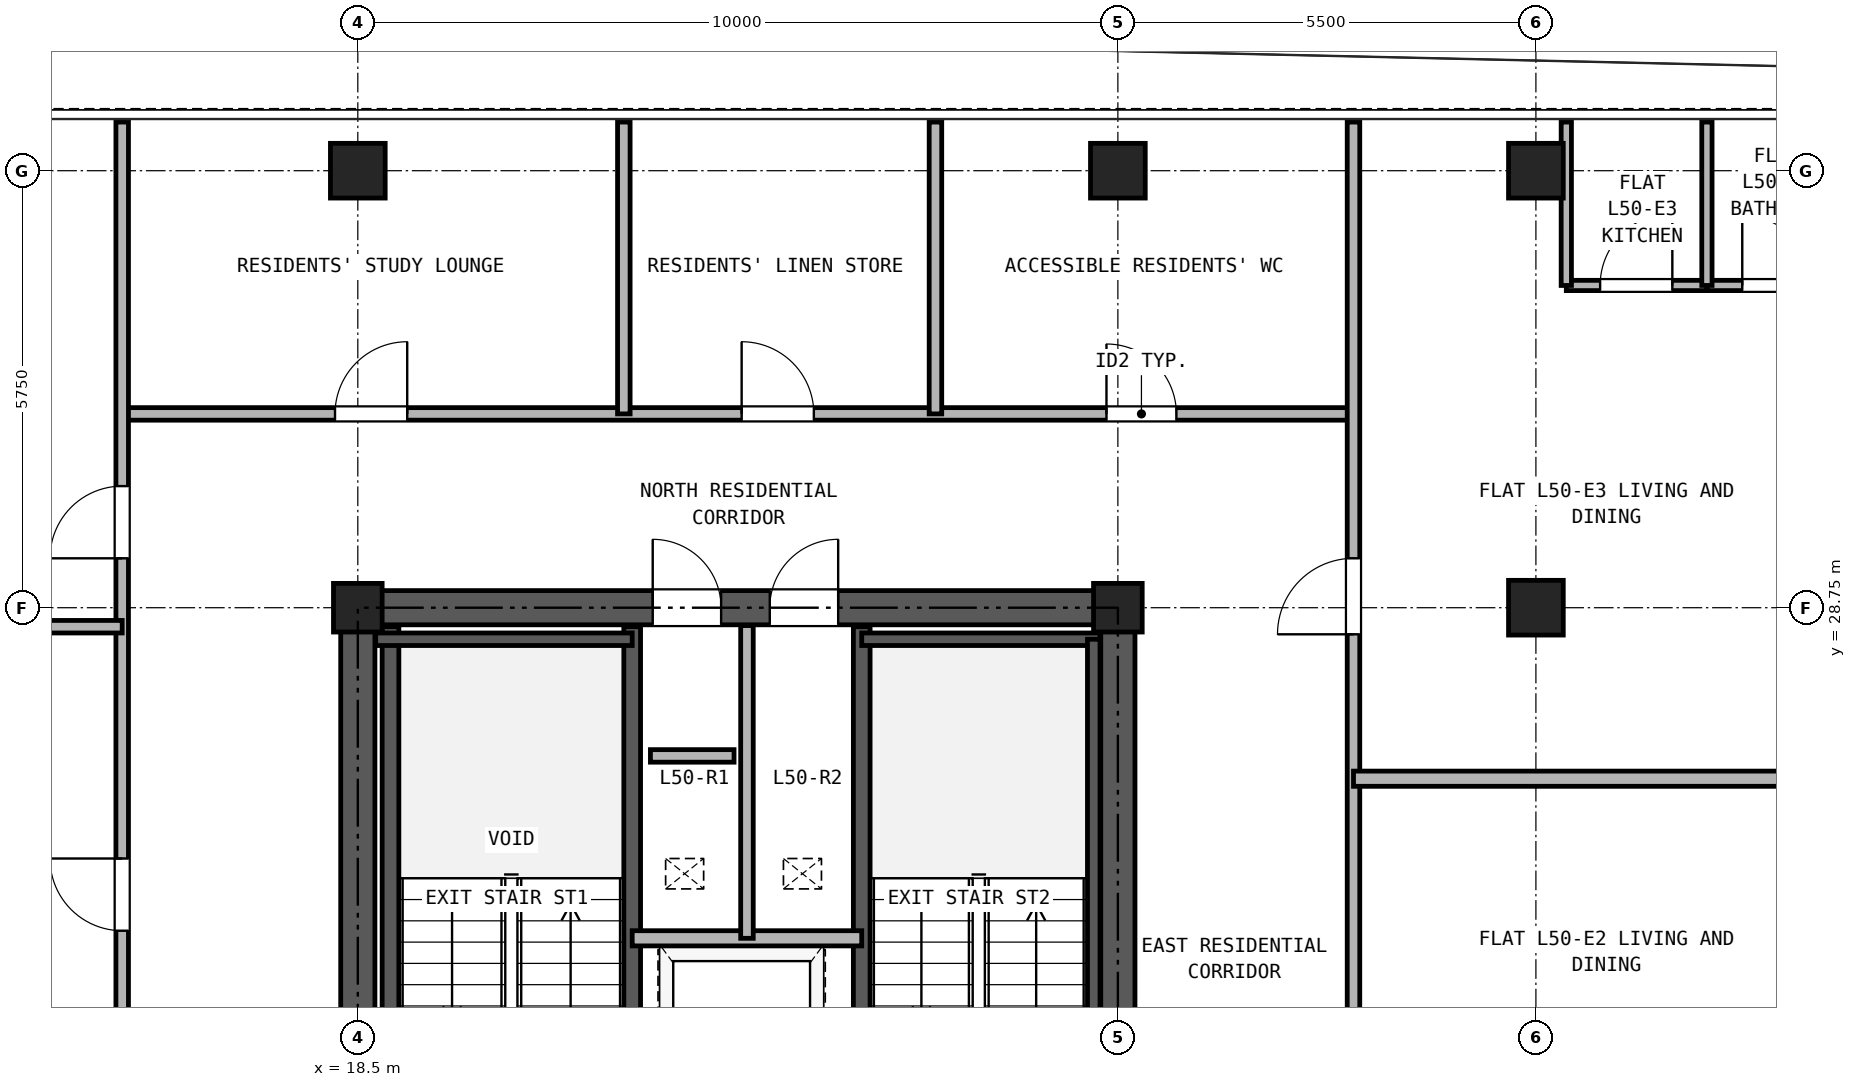
"""IFC4 building model, lengths in metres.
Left out: names, types, materials, properties, quantities, classifications, styles, units other than length and angle.
Written with IfcOpenShell. Run it as: python <this file> out.ifc"""

import sys

from ifc_helpers import new_model, si_unit, direction, frame, frame_2d, origin, origin_2d, place, context, subcontext, project, spatial, rectangle, hollow_rectangle, extrude, source, transform, mapped, element, fill, save


model = new_model("IFC4")
c1 = context("Model", 3, precision=1e-05, world=origin(), true_north=direction((0.0, 1.0)))
c2 = subcontext(c1, "Body", "Model", "MODEL_VIEW")
j1 = project(units=[si_unit("LENGTHUNIT", "METRE"), si_unit("PLANEANGLEUNIT", "RADIAN")], contexts=[c1])
p1 = place(None, origin())
s1 = spatial("IfcSite", under=j1, at=p1, CompositionType="ELEMENT")
p2 = place(p1, origin())
s2 = spatial("IfcBuilding", under=s1, at=p2, CompositionType="ELEMENT")
p3 = place(p2, frame((0.0, 0.0, 178.5)))
s3 = spatial("IfcBuildingStorey", under=s2, at=p3, CompositionType="ELEMENT", Elevation=178.5)
m1 = source(origin(), c2, "Body", "SweptSolid", [
    extrude(hollow_rectangle(XDim=0.72, YDim=0.72, WallThickness=0.04, at=origin_2d()), origin(), (0.0, 0.0, 1.0), 2.95),
])
for number, where, z_axis, x_axis in (
    (1, (18.5, 34.5, 0.0), (0.0, 0.0, 1.0), (1.0, 0.0, 0.0)),
    (2, (28.5, 34.5, 0.0), (0.0, 0.0, 1.0), (1.0, 0.0, 0.0)),
    (3, (34.0, 34.5, 0.0), (0.0, 0.0, 1.0), (1.0, 0.0, 0.0)),
):
    element("IfcColumn", number, at=place(p3, frame(where, z_axis=z_axis, x_axis=x_axis)), inside=s3, PredefinedType="COLUMN", context=c2, shape_type="MappedRepresentation", body=[
        mapped(m1, transform((0.0, 0.0, 0.0), x_axis=(1.0, 0.0, 0.0), y_axis=(0.0, 1.0, 0.0), z_axis=(0.0, 0.0, 1.0), scale=1.0)),
    ])
m2 = source(origin(), c2, "Body", "SweptSolid", [
    extrude(hollow_rectangle(XDim=0.64, YDim=0.64, WallThickness=0.035, at=origin_2d()), origin(), (0.0, 0.0, 1.0), 2.95),
])
for number, where, z_axis, x_axis in (
    (4, (18.5, 28.75, 0.0), (0.0, 0.0, 1.0), (1.0, 0.0, 0.0)),
    (5, (28.5, 28.75, 0.0), (0.0, 0.0, 1.0), (1.0, 0.0, 0.0)),
):
    element("IfcColumn", number, at=place(p3, frame(where, z_axis=z_axis, x_axis=x_axis)), inside=s3, PredefinedType="COLUMN", context=c2, shape_type="MappedRepresentation", body=[
        mapped(m2, transform((0.0, 0.0, 0.0), x_axis=(1.0, 0.0, 0.0), y_axis=(0.0, 1.0, 0.0), z_axis=(0.0, 0.0, 1.0), scale=1.0)),
    ])
p4 = place(p3, frame((34.0, 28.75, 0.0), z_axis=(0.0, 0.0, 1.0), x_axis=(1.0, 0.0, 0.0)))
e6 = element("IfcColumn", 6, at=p4, inside=s3, PredefinedType="COLUMN", context=c2, shape_type="MappedRepresentation", body=[
    mapped(m1, transform((0.0, 0.0, 0.0), x_axis=(1.0, 0.0, 0.0), y_axis=(0.0, 1.0, 0.0), z_axis=(0.0, 0.0, 1.0), scale=1.0)),
])
p5 = place(p3, frame((18.275, 28.75, 0.0), z_axis=(0.0, 0.0, 1.0), x_axis=(1.0, 0.0, 0.0)))
e7 = element("IfcWall", 7, at=p5, inside=s3, PredefinedType="SHEAR", context=c2, shape_type="SweptSolid", body=[
    extrude(rectangle(XDim=10.45, YDim=0.45, at=frame_2d((5.225, 0.0))), origin(), (0.0, 0.0, 1.0), 2.95),
])
p6 = place(p5, frame((4.105, 0.0, 0.0)))
e8 = element("IfcOpeningElement", 8, at=p6, cuts=e7, PredefinedType="OPENING", context=c2, shape_type="SweptSolid", body=[
    extrude(rectangle(XDim=0.9, YDim=2.05, at=frame_2d((0.45, 1.025))), frame((0.0, 0.235, 0.0), z_axis=(0.0, -1.0, 0.0), x_axis=(1.0, 0.0, 0.0)), (0.0, 0.0, 1.0), 0.47),
])
p7 = place(p5, frame((5.645, 0.0, 0.0)))
e9 = element("IfcOpeningElement", 9, at=p7, cuts=e7, PredefinedType="OPENING", context=c2, shape_type="SweptSolid", body=[
    extrude(rectangle(XDim=0.9, YDim=2.05, at=frame_2d((0.45, 1.025))), frame((0.0, 0.235, 0.0), z_axis=(0.0, -1.0, 0.0), x_axis=(1.0, 0.0, 0.0)), (0.0, 0.0, 1.0), 0.47),
])
p8 = place(p3, frame((18.5, 11.725, 0.0), z_axis=(0.0, 0.0, 1.0), x_axis=(0.0, 1.0, 0.0)))
e10 = element("IfcWall", 10, at=p8, inside=s3, PredefinedType="SHEAR", context=c2, shape_type="SweptSolid", body=[
    extrude(rectangle(XDim=16.8, YDim=0.45, at=frame_2d((8.4, 0.0))), origin(), (0.0, 0.0, 1.0), 2.95),
])
p9 = place(p8, frame((7.425, 0.0, 0.0)))
e11 = element("IfcOpeningElement", 11, at=p9, cuts=e10, PredefinedType="OPENING", context=c2, shape_type="SweptSolid", body=[
    extrude(rectangle(XDim=1.15, YDim=2.2, at=frame_2d((0.575, 1.1))), frame((0.0, 0.235, 0.0), z_axis=(0.0, -1.0, 0.0), x_axis=(1.0, 0.0, 0.0)), (0.0, 0.0, 1.0), 0.47),
])
p10 = place(p3, frame((28.5, 11.725, 0.0), z_axis=(0.0, 0.0, 1.0), x_axis=(0.0, 1.0, 0.0)))
e12 = element("IfcWall", 12, at=p10, inside=s3, PredefinedType="SHEAR", context=c2, shape_type="SweptSolid", body=[
    extrude(rectangle(XDim=16.8, YDim=0.45, at=frame_2d((8.4, 0.0))), origin(), (0.0, 0.0, 1.0), 2.95),
])
p11 = place(p10, frame((7.425, 0.0, 0.0)))
e13 = element("IfcOpeningElement", 13, at=p11, cuts=e12, PredefinedType="OPENING", context=c2, shape_type="SweptSolid", body=[
    extrude(rectangle(XDim=1.15, YDim=2.2, at=frame_2d((0.575, 1.1))), frame((0.0, 0.235, 0.0), z_axis=(0.0, -1.0, 0.0), x_axis=(1.0, 0.0, 0.0)), (0.0, 0.0, 1.0), 0.47),
])
for number, where, z_axis, x_axis in (
    (14, (18.93, 21.39, 0.0), (0.0, 0.0, 1.0), (0.0, 1.0, 0.0)),
    (15, (22.11, 21.39, 0.0), (0.0, 0.0, 1.0), (0.0, 1.0, 0.0)),
    (16, (25.13, 21.39, 0.0), (0.0, 0.0, 1.0), (0.0, 1.0, 0.0)),
):
    element("IfcWall", number, at=place(p3, frame(where, z_axis=z_axis, x_axis=x_axis)), inside=s3, PredefinedType="SOLIDWALL", context=c2, shape_type="SweptSolid", body=[
        extrude(rectangle(XDim=7.11, YDim=0.22, at=frame_2d((3.555, 0.0))), origin(), (0.0, 0.0, 1.0), 2.95),
    ])
p12 = place(p3, frame((18.735, 28.335, 0.0), z_axis=(0.0, 0.0, 1.0), x_axis=(1.0, 0.0, 0.0)))
e17 = element("IfcWall", 17, at=p12, inside=s3, PredefinedType="PARTITIONING", context=c2, shape_type="SweptSolid", body=[
    extrude(rectangle(XDim=3.375, YDim=0.165, at=frame_2d((1.688, 0.0))), origin(), (0.0, 0.0, 1.0), 2.95),
])
p13 = place(p3, frame((25.13, 28.335, 0.0), z_axis=(0.0, 0.0, 1.0), x_axis=(1.0, 0.0, 0.0)))
e18 = element("IfcWall", 18, at=p13, inside=s3, PredefinedType="PARTITIONING", context=c2, shape_type="SweptSolid", body=[
    extrude(rectangle(XDim=3.135, YDim=0.165, at=frame_2d((1.567, 0.0))), origin(), (0.0, 0.0, 1.0), 2.95),
])
p14 = place(p3, frame((28.183, 21.39, 0.0), z_axis=(0.0, 0.0, 1.0), x_axis=(0.0, 1.0, 0.0)))
e19 = element("IfcWall", 19, at=p14, inside=s3, PredefinedType="PARTITIONING", context=c2, shape_type="SweptSolid", body=[
    extrude(rectangle(XDim=6.945, YDim=0.165, at=frame_2d((3.473, 0.0))), origin(), (0.0, 0.0, 1.0), 2.95),
])
p15 = place(p3, frame((22.11, 24.4, 0.0), z_axis=(0.0, 0.0, 1.0), x_axis=(1.0, 0.0, 0.0)))
e20 = element("IfcWall", 20, at=p15, inside=s3, PredefinedType="PARTITIONING", context=c2, shape_type="SweptSolid", body=[
    extrude(rectangle(XDim=3.02, YDim=0.2, at=frame_2d((1.51, 0.0))), origin(), (0.0, 0.0, 1.0), 2.95),
])
p16 = place(p3, frame((23.62, 24.4, 0.0), z_axis=(0.0, 0.0, 1.0), x_axis=(0.0, 1.0, 0.0)))
e21 = element("IfcWall", 21, at=p16, inside=s3, PredefinedType="PARTITIONING", context=c2, shape_type="SweptSolid", body=[
    extrude(rectangle(XDim=4.115, YDim=0.165, at=frame_2d((2.058, 0.0))), origin(), (0.0, 0.0, 1.0), 2.95),
])
p17 = place(p3, frame((15.4, 31.3, 0.0), z_axis=(0.0, 0.0, 1.0), x_axis=(1.0, 0.0, 0.0)))
e22 = element("IfcWall", 22, at=p17, inside=s3, PredefinedType="PARTITIONING", context=c2, shape_type="SweptSolid", body=[
    extrude(rectangle(XDim=16.2, YDim=0.165, at=frame_2d((8.1, 0.0))), origin(), (0.0, 0.0, 1.0), 2.95),
])
p18 = place(p17, frame((2.8, 0.0, 0.0)))
e23 = element("IfcOpeningElement", 23, at=p18, cuts=e22, PredefinedType="OPENING", context=c2, shape_type="SweptSolid", body=[
    extrude(rectangle(XDim=0.95, YDim=2.15, at=frame_2d((0.475, 1.075))), frame((0.0, 0.093, 0.0), z_axis=(0.0, -1.0, 0.0), x_axis=(1.0, 0.0, 0.0)), (0.0, 0.0, 1.0), 0.185),
])
p19 = place(p17, frame((8.15, 0.0, 0.0)))
e24 = element("IfcOpeningElement", 24, at=p19, cuts=e22, PredefinedType="OPENING", context=c2, shape_type="SweptSolid", body=[
    extrude(rectangle(XDim=0.95, YDim=2.15, at=frame_2d((0.475, 1.075))), frame((0.0, 0.093, 0.0), z_axis=(0.0, -1.0, 0.0), x_axis=(1.0, 0.0, 0.0)), (0.0, 0.0, 1.0), 0.185),
])
p20 = place(p17, frame((12.95, 0.0, 0.0)))
e25 = element("IfcOpeningElement", 25, at=p20, cuts=e22, PredefinedType="OPENING", context=c2, shape_type="SweptSolid", body=[
    extrude(rectangle(XDim=0.92, YDim=2.1, at=frame_2d((0.46, 1.05))), frame((0.0, 0.093, 0.0), z_axis=(0.0, -1.0, 0.0), x_axis=(1.0, 0.0, 0.0)), (0.0, 0.0, 1.0), 0.185),
])
p21 = place(p3, frame((15.4, 10.7, 0.0), z_axis=(0.0, 0.0, 1.0), x_axis=(0.0, 1.0, 0.0)))
e26 = element("IfcWall", 26, at=p21, inside=s3, PredefinedType="PARTITIONING", context=c2, shape_type="SweptSolid", body=[
    extrude(rectangle(XDim=24.44, YDim=0.165, at=frame_2d((12.22, 0.0))), origin(), (0.0, 0.0, 1.0), 2.95),
])
p22 = place(p21, frame((4.9, 0.0, 0.0)))
e27 = element("IfcOpeningElement", 27, at=p22, cuts=e26, PredefinedType="OPENING", context=c2, shape_type="SweptSolid", body=[
    extrude(rectangle(XDim=0.95, YDim=2.15, at=frame_2d((0.475, 1.075))), frame((0.0, 0.093, 0.0), z_axis=(0.0, -1.0, 0.0), x_axis=(1.0, 0.0, 0.0)), (0.0, 0.0, 1.0), 0.185),
])
p23 = place(p21, frame((13.8, 0.0, 0.0)))
e28 = element("IfcOpeningElement", 28, at=p23, cuts=e26, PredefinedType="OPENING", context=c2, shape_type="SweptSolid", body=[
    extrude(rectangle(XDim=0.95, YDim=2.15, at=frame_2d((0.475, 1.075))), frame((0.0, 0.093, 0.0), z_axis=(0.0, -1.0, 0.0), x_axis=(1.0, 0.0, 0.0)), (0.0, 0.0, 1.0), 0.185),
])
p24 = place(p21, frame((18.7, 0.0, 0.0)))
e29 = element("IfcOpeningElement", 29, at=p24, cuts=e26, PredefinedType="OPENING", context=c2, shape_type="SweptSolid", body=[
    extrude(rectangle(XDim=0.95, YDim=2.15, at=frame_2d((0.475, 1.075))), frame((0.0, 0.093, 0.0), z_axis=(0.0, -1.0, 0.0), x_axis=(1.0, 0.0, 0.0)), (0.0, 0.0, 1.0), 0.185),
])
p25 = place(p3, frame((31.6, 10.7, 0.0), z_axis=(0.0, 0.0, 1.0), x_axis=(0.0, 1.0, 0.0)))
e30 = element("IfcWall", 30, at=p25, inside=s3, PredefinedType="PARTITIONING", context=c2, shape_type="SweptSolid", body=[
    extrude(rectangle(XDim=24.44, YDim=0.165, at=frame_2d((12.22, 0.0))), origin(), (0.0, 0.0, 1.0), 2.95),
])
p26 = place(p25, frame((3.25, 0.0, 0.0)))
e31 = element("IfcOpeningElement", 31, at=p26, cuts=e30, PredefinedType="OPENING", context=c2, shape_type="SweptSolid", body=[
    extrude(rectangle(XDim=1.0, YDim=2.15, at=frame_2d((0.5, 1.075))), frame((0.0, 0.093, 0.0), z_axis=(0.0, -1.0, 0.0), x_axis=(1.0, 0.0, 0.0)), (0.0, 0.0, 1.0), 0.185),
])
p27 = place(p25, frame((11.15, 0.0, 0.0)))
e32 = element("IfcOpeningElement", 32, at=p27, cuts=e30, PredefinedType="OPENING", context=c2, shape_type="SweptSolid", body=[
    extrude(rectangle(XDim=1.0, YDim=2.15, at=frame_2d((0.5, 1.075))), frame((0.0, 0.093, 0.0), z_axis=(0.0, -1.0, 0.0), x_axis=(1.0, 0.0, 0.0)), (0.0, 0.0, 1.0), 0.185),
])
p28 = place(p25, frame((17.7, 0.0, 0.0)))
e33 = element("IfcOpeningElement", 33, at=p28, cuts=e30, PredefinedType="OPENING", context=c2, shape_type="SweptSolid", body=[
    extrude(rectangle(XDim=1.0, YDim=2.15, at=frame_2d((0.5, 1.075))), frame((0.0, 0.093, 0.0), z_axis=(0.0, -1.0, 0.0), x_axis=(1.0, 0.0, 0.0)), (0.0, 0.0, 1.0), 0.185),
])
p29 = place(p3, frame((0.16, 28.5, 0.0), z_axis=(0.0, 0.0, 1.0), x_axis=(1.0, 0.0, 0.0)))
e34 = element("IfcWall", 34, at=p29, inside=s3, PredefinedType="PARTITIONING", context=c2, shape_type="SweptSolid", body=[
    extrude(rectangle(XDim=15.24, YDim=0.165, at=frame_2d((7.62, 0.0))), origin(), (0.0, 0.0, 1.0), 2.323),
])
p30 = place(p3, frame((31.6, 26.5, 0.0), z_axis=(0.0, 0.0, 1.0), x_axis=(1.0, 0.0, 0.0)))
e35 = element("IfcWall", 35, at=p30, inside=s3, PredefinedType="PARTITIONING", context=c2, shape_type="SweptSolid", body=[
    extrude(rectangle(XDim=10.04, YDim=0.2, at=frame_2d((5.02, 0.0))), origin(), (0.0, 0.0, 1.0), 2.95),
])
p31 = place(p3, frame((34.4, 32.99, 0.0), z_axis=(0.0, 0.0, 1.0), x_axis=(1.0, 0.0, 0.0)))
e36 = element("IfcWall", 36, at=p31, inside=s3, PredefinedType="PARTITIONING", context=c2, shape_type="SweptSolid", body=[
    extrude(rectangle(XDim=1.85, YDim=0.135, at=frame_2d((0.925, 0.0))), origin(), (0.0, 0.0, 1.0), 2.95),
])
p32 = place(p31, frame((0.445, 0.0, 0.0)))
e37 = element("IfcOpeningElement", 37, at=p32, cuts=e36, PredefinedType="OPENING", context=c2, shape_type="SweptSolid", body=[
    extrude(rectangle(XDim=0.95, YDim=2.15, at=frame_2d((0.475, 1.075))), frame((0.0, 0.077, 0.0), z_axis=(0.0, -1.0, 0.0), x_axis=(1.0, 0.0, 0.0)), (0.0, 0.0, 1.0), 0.155),
])
p33 = place(p3, frame((36.25, 32.99, 0.0), z_axis=(0.0, 0.0, 1.0), x_axis=(1.0, 0.0, 0.0)))
e38 = element("IfcWall", 38, at=p33, inside=s3, PredefinedType="PARTITIONING", context=c2, shape_type="SweptSolid", body=[
    extrude(rectangle(XDim=1.85, YDim=0.135, at=frame_2d((0.925, 0.0))), origin(), (0.0, 0.0, 1.0), 2.95),
])
p34 = place(p33, frame((0.465, 0.0, 0.0)))
e39 = element("IfcOpeningElement", 39, at=p34, cuts=e38, PredefinedType="OPENING", context=c2, shape_type="SweptSolid", body=[
    extrude(rectangle(XDim=0.92, YDim=2.1, at=frame_2d((0.46, 1.05))), frame((0.0, 0.077, 0.0), z_axis=(0.0, -1.0, 0.0), x_axis=(1.0, 0.0, 0.0)), (0.0, 0.0, 1.0), 0.155),
])
for number, where, z_axis, x_axis in (
    (40, (34.4, 32.99, 0.0), (0.0, 0.0, 1.0), (0.0, 1.0, 0.0)),
    (41, (36.25, 32.99, 0.0), (0.0, 0.0, 1.0), (0.0, 1.0, 0.0)),
):
    element("IfcWall", number, at=place(p3, frame(where, z_axis=z_axis, x_axis=x_axis)), inside=s3, PredefinedType="PARTITIONING", context=c2, shape_type="SweptSolid", body=[
        extrude(rectangle(XDim=2.15, YDim=0.135, at=frame_2d((1.075, 0.0))), origin(), (0.0, 0.0, 1.0), 2.95),
    ])
for number, where, z_axis, x_axis in (
    (42, (22.0, 31.3, 0.0), (0.0, 0.0, 1.0), (0.0, 1.0, 0.0)),
    (43, (26.1, 31.3, 0.0), (0.0, 0.0, 1.0), (0.0, 1.0, 0.0)),
):
    element("IfcWall", number, at=place(p3, frame(where, z_axis=z_axis, x_axis=x_axis)), inside=s3, PredefinedType="PARTITIONING", context=c2, shape_type="SweptSolid", body=[
        extrude(rectangle(XDim=3.84, YDim=0.165, at=frame_2d((1.92, 0.0))), origin(), (0.0, 0.0, 1.0), 2.95),
    ])
p35 = place(p3, frame((22.35, 26.8, 0.0), z_axis=(0.0, 0.0, 1.0), x_axis=(1.0, 0.0, 0.0)))
e44 = element("IfcWall", 44, at=p35, inside=s3, PredefinedType="PARTITIONING", context=c2, shape_type="SweptSolid", body=[
    extrude(rectangle(XDim=1.1, YDim=0.165, at=frame_2d((0.55, 0.0))), origin(), (0.0, 0.0, 1.0), 2.95),
])
p36 = place(p6, origin())
e45 = element("IfcDoor", 45, at=p36, inside=s3, OperationType="SINGLE_SWING_LEFT", PredefinedType="DOOR", context=c2, shape_type="SweptSolid", body=[
    extrude(rectangle(XDim=0.9, YDim=2.05, at=frame_2d((0.45, 1.025))), frame((0.0, 0.025, 0.0), z_axis=(0.0, -1.0, 0.0), x_axis=(1.0, 0.0, 0.0)), (0.0, 0.0, 1.0), 0.05),
])
fill(e8, e45)
p37 = place(p7, origin())
e46 = element("IfcDoor", 46, at=p37, inside=s3, OperationType="SINGLE_SWING_RIGHT", PredefinedType="DOOR", context=c2, shape_type="SweptSolid", body=[
    extrude(rectangle(XDim=0.9, YDim=2.05, at=frame_2d((0.45, 1.025))), frame((0.0, 0.025, 0.0), z_axis=(0.0, -1.0, 0.0), x_axis=(1.0, 0.0, 0.0)), (0.0, 0.0, 1.0), 0.05),
])
fill(e9, e46)
p38 = place(p23, frame((0.95, 0.0, 0.0), z_axis=(0.0, 0.0, 1.0), x_axis=(-1.0, 0.0, 0.0)))
e47 = element("IfcDoor", 47, at=p38, inside=s3, OperationType="SINGLE_SWING_RIGHT", PredefinedType="DOOR", context=c2, shape_type="SweptSolid", body=[
    extrude(rectangle(XDim=0.95, YDim=2.15, at=frame_2d((0.475, 1.075))), frame((0.0, 0.025, 0.0), z_axis=(0.0, -1.0, 0.0), x_axis=(1.0, 0.0, 0.0)), (0.0, 0.0, 1.0), 0.05),
])
fill(e28, e47)
p39 = place(p24, frame((0.95, 0.0, 0.0), z_axis=(0.0, 0.0, 1.0), x_axis=(-1.0, 0.0, 0.0)))
e48 = element("IfcDoor", 48, at=p39, inside=s3, OperationType="SINGLE_SWING_LEFT", PredefinedType="DOOR", context=c2, shape_type="SweptSolid", body=[
    extrude(rectangle(XDim=0.95, YDim=2.15, at=frame_2d((0.475, 1.075))), frame((0.0, 0.025, 0.0), z_axis=(0.0, -1.0, 0.0), x_axis=(1.0, 0.0, 0.0)), (0.0, 0.0, 1.0), 0.05),
])
fill(e29, e48)
p40 = place(p32, frame((0.95, 0.0, 0.0), z_axis=(0.0, 0.0, 1.0), x_axis=(-1.0, 0.0, 0.0)))
e49 = element("IfcDoor", 49, at=p40, inside=s3, OperationType="SINGLE_SWING_RIGHT", PredefinedType="DOOR", context=c2, shape_type="SweptSolid", body=[
    extrude(rectangle(XDim=0.95, YDim=2.15, at=frame_2d((0.475, 1.075))), frame((0.0, 0.025, 0.0), z_axis=(0.0, -1.0, 0.0), x_axis=(1.0, 0.0, 0.0)), (0.0, 0.0, 1.0), 0.05),
])
fill(e37, e49)
p41 = place(p34, frame((0.92, 0.0, 0.0), z_axis=(0.0, 0.0, 1.0), x_axis=(-1.0, 0.0, 0.0)))
e50 = element("IfcDoor", 50, at=p41, inside=s3, OperationType="SINGLE_SWING_LEFT", PredefinedType="DOOR", context=c2, shape_type="SweptSolid", body=[
    extrude(rectangle(XDim=0.92, YDim=2.1, at=frame_2d((0.46, 1.05))), frame((0.0, 0.025, 0.0), z_axis=(0.0, -1.0, 0.0), x_axis=(1.0, 0.0, 0.0)), (0.0, 0.0, 1.0), 0.05),
])
fill(e39, e50)
p42 = place(p28, frame((1.0, 0.0, 0.0), z_axis=(0.0, 0.0, 1.0), x_axis=(-1.0, 0.0, 0.0)))
e51 = element("IfcDoor", 51, at=p42, inside=s3, OperationType="SINGLE_SWING_LEFT", PredefinedType="DOOR", context=c2, shape_type="SweptSolid", body=[
    extrude(rectangle(XDim=1.0, YDim=2.15, at=frame_2d((0.5, 1.075))), frame((0.0, 0.025, 0.0), z_axis=(0.0, -1.0, 0.0), x_axis=(1.0, 0.0, 0.0)), (0.0, 0.0, 1.0), 0.05),
])
fill(e33, e51)
p43 = place(p18, origin())
e52 = element("IfcDoor", 52, at=p43, inside=s3, OperationType="SINGLE_SWING_RIGHT", PredefinedType="DOOR", context=c2, shape_type="SweptSolid", body=[
    extrude(rectangle(XDim=0.95, YDim=2.15, at=frame_2d((0.475, 1.075))), frame((0.0, 0.025, 0.0), z_axis=(0.0, -1.0, 0.0), x_axis=(1.0, 0.0, 0.0)), (0.0, 0.0, 1.0), 0.05),
])
fill(e23, e52)
p44 = place(p19, origin())
e53 = element("IfcDoor", 53, at=p44, inside=s3, OperationType="SINGLE_SWING_LEFT", PredefinedType="DOOR", context=c2, shape_type="SweptSolid", body=[
    extrude(rectangle(XDim=0.95, YDim=2.15, at=frame_2d((0.475, 1.075))), frame((0.0, 0.025, 0.0), z_axis=(0.0, -1.0, 0.0), x_axis=(1.0, 0.0, 0.0)), (0.0, 0.0, 1.0), 0.05),
])
fill(e24, e53)
p45 = place(p20, origin())
e54 = element("IfcDoor", 54, at=p45, inside=s3, OperationType="SINGLE_SWING_LEFT", PredefinedType="DOOR", context=c2, shape_type="SweptSolid", body=[
    extrude(rectangle(XDim=0.92, YDim=2.1, at=frame_2d((0.46, 1.05))), frame((0.0, 0.025, 0.0), z_axis=(0.0, -1.0, 0.0), x_axis=(1.0, 0.0, 0.0)), (0.0, 0.0, 1.0), 0.05),
])
fill(e25, e54)
save(model, sys.argv[1])
